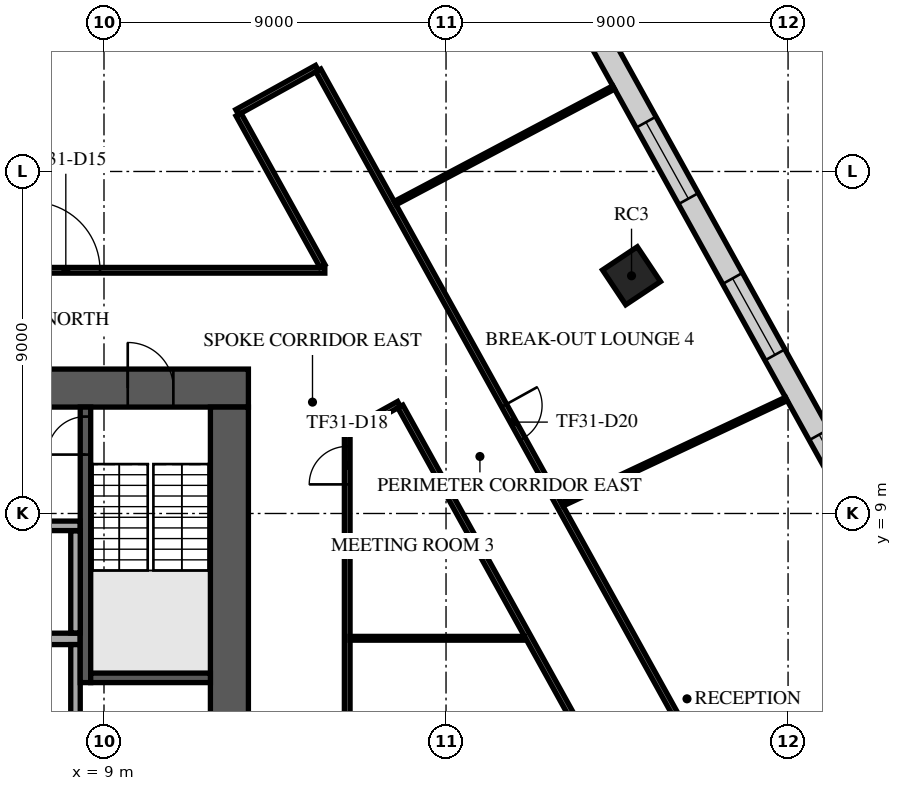
"""IFC4 building model, lengths in metres.
Left out: names, types, materials, properties, quantities, classifications, styles, units other than length and angle.
Written with IfcOpenShell. Run it as: python <this file> out.ifc"""

import sys

from ifc_helpers import new_model, si_unit, direction, frame, frame_2d, origin, origin_2d, place, context, subcontext, project, spatial, rectangle, extrude, element, fill, save


model = new_model("IFC4")
c1 = context("Model", 3, precision=1e-05, world=origin(), true_north=direction((0.0, 1.0)))
c2 = subcontext(c1, "Body", "Model", "MODEL_VIEW")
j1 = project(units=[si_unit("LENGTHUNIT", "METRE"), si_unit("PLANEANGLEUNIT", "RADIAN")], contexts=[c1])
p1 = place(None, origin())
s1 = spatial("IfcSite", under=j1, at=p1, CompositionType="ELEMENT")
p2 = place(p1, origin())
s2 = spatial("IfcBuilding", under=s1, at=p2, CompositionType="ELEMENT")
p3 = place(p2, frame((0.0, 0.0, 135.7)))
s3 = spatial("IfcBuildingStorey", under=s2, at=p3, CompositionType="ELEMENT", Elevation=135.7)
p4 = place(p3, frame((22.881, 15.255, -0.4), z_axis=(0.0, 0.0, 1.0), x_axis=(0.832028680356, 0.55473261583, 0.0)))
e1 = element("IfcColumn", 1, at=p4, inside=s3, PredefinedType="COLUMN", context=c2, shape_type="SweptSolid", body=[
    extrude(rectangle(XDim=1.1, YDim=1.1, at=origin_2d()), origin(), (0.0, 0.0, 1.0), 4.4),
])
p5 = place(p3, frame((-12.8, 12.3, 0.0), z_axis=(0.0, 0.0, 1.0), x_axis=(1.0, 0.0, 0.0)))
e2 = element("IfcWall", 2, at=p5, inside=s3, PredefinedType="SHEAR", context=c2, shape_type="SweptSolid", body=[
    extrude(rectangle(XDim=25.6, YDim=1.0, at=frame_2d((12.8, 0.0))), origin(), (0.0, 0.0, 1.0), 3.6),
])
p6 = place(p5, frame((11.6, 0.0, 0.0)))
e3 = element("IfcOpeningElement", 3, at=p6, cuts=e2, PredefinedType="OPENING", context=c2, shape_type="SweptSolid", body=[
    extrude(rectangle(XDim=2.4, YDim=2.4, at=frame_2d((1.2, 1.2))), frame((0.0, 0.51, 0.0), z_axis=(0.0, -1.0, 0.0), x_axis=(1.0, 0.0, 0.0)), (0.0, 0.0, 1.0), 1.02),
])
p7 = place(p5, frame((22.425, 0.0, 0.0)))
e4 = element("IfcOpeningElement", 4, at=p7, cuts=e2, PredefinedType="OPENING", context=c2, shape_type="SweptSolid", body=[
    extrude(rectangle(XDim=1.2, YDim=2.1, at=frame_2d((0.6, 1.05))), frame((0.0, 0.51, 0.0), z_axis=(0.0, -1.0, 0.0), x_axis=(1.0, 0.0, 0.0)), (0.0, 0.0, 1.0), 1.02),
])
p8 = place(p5, frame((1.4, 0.0, 0.0)))
e5 = element("IfcOpeningElement", 5, at=p8, cuts=e2, PredefinedType="OPENING", context=c2, shape_type="SweptSolid", body=[
    extrude(rectangle(XDim=1.0, YDim=2.1, at=frame_2d((0.5, 1.05))), frame((0.0, 0.51, 0.0), z_axis=(0.0, -1.0, 0.0), x_axis=(1.0, 0.0, 0.0)), (0.0, 0.0, 1.0), 1.02),
])
p9 = place(p3, frame((12.3, -11.8, 0.0), z_axis=(0.0, 0.0, 1.0), x_axis=(0.0, 1.0, 0.0)))
e6 = element("IfcWall", 6, at=p9, inside=s3, PredefinedType="SHEAR", context=c2, shape_type="SweptSolid", body=[
    extrude(rectangle(XDim=23.6, YDim=1.0, at=frame_2d((11.8, 0.0))), origin(), (0.0, 0.0, 1.0), 3.6),
])
p10 = place(p9, frame((10.6, 0.0, 0.0)))
e7 = element("IfcOpeningElement", 7, at=p10, cuts=e6, PredefinedType="OPENING", context=c2, shape_type="SweptSolid", body=[
    extrude(rectangle(XDim=2.4, YDim=2.4, at=frame_2d((1.2, 1.2))), frame((0.0, 0.51, 0.0), z_axis=(0.0, -1.0, 0.0), x_axis=(1.0, 0.0, 0.0)), (0.0, 0.0, 1.0), 1.02),
])
p11 = place(p3, frame((-8.375, 5.7, 0.0), z_axis=(0.0, 0.0, 1.0), x_axis=(1.0, 0.0, 0.0)))
e8 = element("IfcWall", 8, at=p11, inside=s3, PredefinedType="SOLIDWALL", context=c2, shape_type="SweptSolid", body=[
    extrude(rectangle(XDim=16.75, YDim=0.3, at=frame_2d((8.375, 0.0))), origin(), (0.0, 0.0, 1.0), 3.6),
])
p12 = place(p3, frame((8.25, 2.85, 0.0), z_axis=(0.0, 0.0, 1.0), x_axis=(0.0, 1.0, 0.0)))
e9 = element("IfcWall", 9, at=p12, inside=s3, PredefinedType="SOLIDWALL", context=c2, shape_type="SweptSolid", body=[
    extrude(rectangle(XDim=2.7, YDim=0.25, at=frame_2d((1.35, 0.0))), origin(), (0.0, 0.0, 1.0), 3.6),
])
p13 = place(p3, frame((8.512, 4.55, 0.0), z_axis=(0.0, 0.0, 1.0), x_axis=(0.0, 1.0, 0.0)))
e10 = element("IfcWall", 10, at=p13, inside=s3, PredefinedType="SOLIDWALL", context=c2, shape_type="SweptSolid", body=[
    extrude(rectangle(XDim=7.25, YDim=0.275, at=frame_2d((3.625, 0.0))), origin(), (0.0, 0.0, 1.0), 3.6),
])
p14 = place(p13, frame((6.0, 0.0, 0.0)))
e11 = element("IfcOpeningElement", 11, at=p14, cuts=e10, PredefinedType="OPENING", context=c2, shape_type="SweptSolid", body=[
    extrude(rectangle(XDim=1.0, YDim=2.1, at=frame_2d((0.5, 1.05))), frame((0.0, 0.147, 0.0), z_axis=(0.0, -1.0, 0.0), x_axis=(1.0, 0.0, 0.0)), (0.0, 0.0, 1.0), 0.295),
])
p15 = place(p3, frame((8.65, 4.675, 0.0), z_axis=(0.0, 0.0, 1.0), x_axis=(1.0, 0.0, 0.0)))
e12 = element("IfcWall", 12, at=p15, inside=s3, PredefinedType="SOLIDWALL", context=c2, shape_type="SweptSolid", body=[
    extrude(rectangle(XDim=3.15, YDim=0.25, at=frame_2d((1.575, 0.0))), origin(), (0.0, 0.0, 1.0), 3.6),
])
p16 = place(p3, frame((8.25, 5.855, 0.0), z_axis=(0.0, 0.0, 1.0), x_axis=(0.0, 1.0, 0.0)))
e13 = element("IfcWall", 13, at=p16, inside=s3, PredefinedType="PARTITIONING", context=c2, shape_type="SweptSolid", body=[
    extrude(rectangle(XDim=2.69, YDim=0.25, at=frame_2d((1.345, 0.0))), origin(), (0.0, 0.0, 1.0), 3.6),
])
p17 = place(p3, frame((-8.35, 8.675, 0.0), z_axis=(0.0, 0.0, 1.0), x_axis=(1.0, 0.0, 0.0)))
e14 = element("IfcWall", 14, at=p17, inside=s3, PredefinedType="PARTITIONING", context=c2, shape_type="SweptSolid", body=[
    extrude(rectangle(XDim=16.72, YDim=0.25, at=frame_2d((8.36, 0.0))), origin(), (0.0, 0.0, 1.0), 3.6),
])
p18 = place(p17, frame((0.975, 0.0, 0.0)))
e15 = element("IfcOpeningElement", 15, at=p18, cuts=e14, PredefinedType="OPENING", context=c2, shape_type="SweptSolid", body=[
    extrude(rectangle(XDim=1.0, YDim=2.1, at=frame_2d((0.5, 1.05))), frame((0.0, 0.135, 0.0), z_axis=(0.0, -1.0, 0.0), x_axis=(1.0, 0.0, 0.0)), (0.0, 0.0, 1.0), 0.27),
])
p19 = place(p17, frame((3.725, 0.0, 0.0)))
e16 = element("IfcOpeningElement", 16, at=p19, cuts=e14, PredefinedType="OPENING", context=c2, shape_type="SweptSolid", body=[
    extrude(rectangle(XDim=1.0, YDim=2.1, at=frame_2d((0.5, 1.05))), frame((0.0, 0.135, 0.0), z_axis=(0.0, -1.0, 0.0), x_axis=(1.0, 0.0, 0.0)), (0.0, 0.0, 1.0), 0.27),
])
p20 = place(p17, frame((9.125, 0.0, 0.0)))
e17 = element("IfcOpeningElement", 17, at=p20, cuts=e14, PredefinedType="OPENING", context=c2, shape_type="SweptSolid", body=[
    extrude(rectangle(XDim=1.2, YDim=2.1, at=frame_2d((0.6, 1.05))), frame((0.0, 0.135, 0.0), z_axis=(0.0, -1.0, 0.0), x_axis=(1.0, 0.0, 0.0)), (0.0, 0.0, 1.0), 0.27),
])
p21 = place(p3, frame((8.775, 34.705, 0.0), z_axis=(0.0, 0.0, 1.0), x_axis=(-0.874620778241, -0.484807687922, 0.0)))
e18 = element("IfcWall", 18, at=p21, inside=s3, PredefinedType="STANDARD", context=c2, shape_type="SweptSolid", body=[
    extrude(rectangle(XDim=49.376, YDim=0.6, at=frame_2d((24.688, 0.0))), origin(), (0.0, 0.0, 1.0), 3.6),
])
p22 = place(p21, frame((1.2, 0.0, 0.9)))
e19 = element("IfcOpeningElement", 19, at=p22, cuts=e18, PredefinedType="OPENING", context=c2, shape_type="SweptSolid", body=[
    extrude(rectangle(XDim=2.1, YDim=2.1, at=frame_2d((1.05, 1.05))), frame((0.0, 0.31, 0.0), z_axis=(0.0, -1.0, 0.0), x_axis=(1.0, 0.0, 0.0)), (0.0, 0.0, 1.0), 0.62),
])
p23 = place(p21, frame((5.7, 0.0, 0.9)))
e20 = element("IfcOpeningElement", 20, at=p23, cuts=e18, PredefinedType="OPENING", context=c2, shape_type="SweptSolid", body=[
    extrude(rectangle(XDim=2.1, YDim=2.1, at=frame_2d((1.05, 1.05))), frame((0.0, 0.31, 0.0), z_axis=(0.0, -1.0, 0.0), x_axis=(1.0, 0.0, 0.0)), (0.0, 0.0, 1.0), 0.62),
])
p24 = place(p21, frame((14.7, 0.0, 0.9)))
e21 = element("IfcOpeningElement", 21, at=p24, cuts=e18, PredefinedType="OPENING", context=c2, shape_type="SweptSolid", body=[
    extrude(rectangle(XDim=2.1, YDim=2.1, at=frame_2d((1.05, 1.05))), frame((0.0, 0.31, 0.0), z_axis=(0.0, -1.0, 0.0), x_axis=(1.0, 0.0, 0.0)), (0.0, 0.0, 1.0), 0.62),
])
p25 = place(p21, frame((19.2, 0.0, 0.9)))
e22 = element("IfcOpeningElement", 22, at=p25, cuts=e18, PredefinedType="OPENING", context=c2, shape_type="SweptSolid", body=[
    extrude(rectangle(XDim=2.1, YDim=2.1, at=frame_2d((1.05, 1.05))), frame((0.0, 0.31, 0.0), z_axis=(0.0, -1.0, 0.0), x_axis=(1.0, 0.0, 0.0)), (0.0, 0.0, 1.0), 0.62),
])
p26 = place(p21, frame((23.7, 0.0, 0.9)))
e23 = element("IfcOpeningElement", 23, at=p26, cuts=e18, PredefinedType="OPENING", context=c2, shape_type="SweptSolid", body=[
    extrude(rectangle(XDim=2.1, YDim=2.1, at=frame_2d((1.05, 1.05))), frame((0.0, 0.31, 0.0), z_axis=(0.0, -1.0, 0.0), x_axis=(1.0, 0.0, 0.0)), (0.0, 0.0, 1.0), 0.62),
])
p27 = place(p21, frame((28.2, 0.0, 0.9)))
e24 = element("IfcOpeningElement", 24, at=p27, cuts=e18, PredefinedType="OPENING", context=c2, shape_type="SweptSolid", body=[
    extrude(rectangle(XDim=2.1, YDim=2.1, at=frame_2d((1.05, 1.05))), frame((0.0, 0.31, 0.0), z_axis=(0.0, -1.0, 0.0), x_axis=(1.0, 0.0, 0.0)), (0.0, 0.0, 1.0), 0.62),
])
p28 = place(p21, frame((32.7, 0.0, 0.9)))
e25 = element("IfcOpeningElement", 25, at=p28, cuts=e18, PredefinedType="OPENING", context=c2, shape_type="SweptSolid", body=[
    extrude(rectangle(XDim=2.1, YDim=2.1, at=frame_2d((1.05, 1.05))), frame((0.0, 0.31, 0.0), z_axis=(0.0, -1.0, 0.0), x_axis=(1.0, 0.0, 0.0)), (0.0, 0.0, 1.0), 0.62),
])
p29 = place(p21, frame((37.2, 0.0, 0.9)))
e26 = element("IfcOpeningElement", 26, at=p29, cuts=e18, PredefinedType="OPENING", context=c2, shape_type="SweptSolid", body=[
    extrude(rectangle(XDim=2.1, YDim=2.1, at=frame_2d((1.05, 1.05))), frame((0.0, 0.31, 0.0), z_axis=(0.0, -1.0, 0.0), x_axis=(1.0, 0.0, 0.0)), (0.0, 0.0, 1.0), 0.62),
])
p30 = place(p21, frame((41.7, 0.0, 0.9)))
e27 = element("IfcOpeningElement", 27, at=p30, cuts=e18, PredefinedType="OPENING", context=c2, shape_type="SweptSolid", body=[
    extrude(rectangle(XDim=2.1, YDim=2.1, at=frame_2d((1.05, 1.05))), frame((0.0, 0.31, 0.0), z_axis=(0.0, -1.0, 0.0), x_axis=(1.0, 0.0, 0.0)), (0.0, 0.0, 1.0), 0.62),
])
p31 = place(p21, frame((46.138, 0.0, 0.9)))
e28 = element("IfcOpeningElement", 28, at=p31, cuts=e18, PredefinedType="OPENING", context=c2, shape_type="SweptSolid", body=[
    extrude(rectangle(XDim=2.1, YDim=2.1, at=frame_2d((1.05, 1.05))), frame((0.0, 0.31, 0.0), z_axis=(0.0, -1.0, 0.0), x_axis=(1.0, 0.0, 0.0)), (0.0, 0.0, 1.0), 0.62),
])
p32 = place(p3, frame((36.291, -4.209, 0.0), z_axis=(0.0, 0.0, 1.0), x_axis=(-0.484811111615, 0.874618880458, 0.0)))
e29 = element("IfcWall", 29, at=p32, inside=s3, PredefinedType="STANDARD", context=c2, shape_type="SweptSolid", body=[
    extrude(rectangle(XDim=42.176, YDim=0.6, at=frame_2d((21.088, 0.0))), origin(), (0.0, 0.0, 1.0), 3.6),
])
p33 = place(p32, frame((1.138, 0.0, 0.9)))
e30 = element("IfcOpeningElement", 30, at=p33, cuts=e29, PredefinedType="OPENING", context=c2, shape_type="SweptSolid", body=[
    extrude(rectangle(XDim=2.3, YDim=2.1, at=frame_2d((1.15, 1.05))), frame((0.0, 0.31, 0.0), z_axis=(0.0, -1.0, 0.0), x_axis=(1.0, 0.0, 0.0)), (0.0, 0.0, 1.0), 0.62),
])
p34 = place(p32, frame((5.776, 0.0, 0.9)))
e31 = element("IfcOpeningElement", 31, at=p34, cuts=e29, PredefinedType="OPENING", context=c2, shape_type="SweptSolid", body=[
    extrude(rectangle(XDim=2.3, YDim=2.1, at=frame_2d((1.15, 1.05))), frame((0.0, 0.31, 0.0), z_axis=(0.0, -1.0, 0.0), x_axis=(1.0, 0.0, 0.0)), (0.0, 0.0, 1.0), 0.62),
])
p35 = place(p32, frame((15.176, 0.0, 0.9)))
e32 = element("IfcOpeningElement", 32, at=p35, cuts=e29, PredefinedType="OPENING", context=c2, shape_type="SweptSolid", body=[
    extrude(rectangle(XDim=2.3, YDim=2.1, at=frame_2d((1.15, 1.05))), frame((0.0, 0.31, 0.0), z_axis=(0.0, -1.0, 0.0), x_axis=(1.0, 0.0, 0.0)), (0.0, 0.0, 1.0), 0.62),
])
p36 = place(p32, frame((19.876, 0.0, 0.9)))
e33 = element("IfcOpeningElement", 33, at=p36, cuts=e29, PredefinedType="OPENING", context=c2, shape_type="SweptSolid", body=[
    extrude(rectangle(XDim=2.3, YDim=2.1, at=frame_2d((1.15, 1.05))), frame((0.0, 0.31, 0.0), z_axis=(0.0, -1.0, 0.0), x_axis=(1.0, 0.0, 0.0)), (0.0, 0.0, 1.0), 0.62),
])
p37 = place(p32, frame((24.576, 0.0, 0.9)))
e34 = element("IfcOpeningElement", 34, at=p37, cuts=e29, PredefinedType="OPENING", context=c2, shape_type="SweptSolid", body=[
    extrude(rectangle(XDim=2.3, YDim=2.1, at=frame_2d((1.15, 1.05))), frame((0.0, 0.31, 0.0), z_axis=(0.0, -1.0, 0.0), x_axis=(1.0, 0.0, 0.0)), (0.0, 0.0, 1.0), 0.62),
])
p38 = place(p32, frame((29.276, 0.0, 0.9)))
e35 = element("IfcOpeningElement", 35, at=p38, cuts=e29, PredefinedType="OPENING", context=c2, shape_type="SweptSolid", body=[
    extrude(rectangle(XDim=2.3, YDim=2.1, at=frame_2d((1.15, 1.05))), frame((0.0, 0.31, 0.0), z_axis=(0.0, -1.0, 0.0), x_axis=(1.0, 0.0, 0.0)), (0.0, 0.0, 1.0), 0.62),
])
p39 = place(p32, frame((33.976, 0.0, 0.9)))
e36 = element("IfcOpeningElement", 36, at=p39, cuts=e29, PredefinedType="OPENING", context=c2, shape_type="SweptSolid", body=[
    extrude(rectangle(XDim=2.3, YDim=2.1, at=frame_2d((1.15, 1.05))), frame((0.0, 0.31, 0.0), z_axis=(0.0, -1.0, 0.0), x_axis=(1.0, 0.0, 0.0)), (0.0, 0.0, 1.0), 0.62),
])
p40 = place(p32, frame((38.676, 0.0, 0.9)))
e37 = element("IfcOpeningElement", 37, at=p40, cuts=e29, PredefinedType="OPENING", context=c2, shape_type="SweptSolid", body=[
    extrude(rectangle(XDim=2.3, YDim=2.1, at=frame_2d((1.15, 1.05))), frame((0.0, 0.31, 0.0), z_axis=(0.0, -1.0, 0.0), x_axis=(1.0, 0.0, 0.0)), (0.0, 0.0, 1.0), 0.62),
])
p41 = place(p3, frame((-3.075, 15.4, 0.0), z_axis=(0.0, 0.0, 1.0), x_axis=(1.0, 0.0, 0.0)))
e38 = element("IfcWall", 38, at=p41, inside=s3, PredefinedType="PARTITIONING", context=c2, shape_type="SweptSolid", body=[
    extrude(rectangle(XDim=17.886, YDim=0.15, at=frame_2d((8.943, 0.0))), origin(), (0.0, 0.0, 1.0), 3.15),
])
p42 = place(p41, frame((10.17, 0.0, 0.0)))
e39 = element("IfcOpeningElement", 39, at=p42, cuts=e38, PredefinedType="OPENING", context=c2, shape_type="SweptSolid", body=[
    extrude(rectangle(XDim=1.8, YDim=2.1, at=frame_2d((0.9, 1.05))), frame((0.0, 0.085, 0.0), z_axis=(0.0, -1.0, 0.0), x_axis=(1.0, 0.0, 0.0)), (0.0, 0.0, 1.0), 0.17),
])
p43 = place(p3, frame((12.504, 19.563, 0.0), z_axis=(0.0, 0.0, 1.0), x_axis=(0.874703778473, 0.484657920522, 0.0)))
e40 = element("IfcWall", 40, at=p43, inside=s3, PredefinedType="PARTITIONING", context=c2, shape_type="SweptSolid", body=[
    extrude(rectangle(XDim=2.4, YDim=0.15, at=frame_2d((1.2, 0.0))), origin(), (0.0, 0.0, 1.0), 3.15),
])
p44 = place(p3, frame((12.54, 19.497, 0.0), z_axis=(0.0, 0.0, 1.0), x_axis=(0.48474201542, -0.874657177691, 0.0)))
e41 = element("IfcWall", 41, at=p44, inside=s3, PredefinedType="PARTITIONING", context=c2, shape_type="SweptSolid", body=[
    extrude(rectangle(XDim=4.557, YDim=0.15, at=frame_2d((2.279, 0.0))), origin(), (0.0, 0.0, 1.0), 3.15),
])
p45 = place(p3, frame((14.639, 20.66, 0.0), z_axis=(0.0, 0.0, 1.0), x_axis=(0.484803020703, -0.874623365294, 0.0)))
e42 = element("IfcWall", 42, at=p45, inside=s3, PredefinedType="PARTITIONING", context=c2, shape_type="SweptSolid", body=[
    extrude(rectangle(XDim=22.02, YDim=0.15, at=frame_2d((11.01, 0.0))), origin(), (0.0, 0.0, 1.0), 3.15),
])
p46 = place(p45, frame((10.083, 0.0, 0.0)))
e43 = element("IfcOpeningElement", 43, at=p46, cuts=e42, PredefinedType="OPENING", context=c2, shape_type="SweptSolid", body=[
    extrude(rectangle(XDim=1.0, YDim=2.1, at=frame_2d((0.5, 1.05))), frame((0.0, 0.085, 0.0), z_axis=(0.0, -1.0, 0.0), x_axis=(1.0, 0.0, 0.0)), (0.0, 0.0, 1.0), 0.17),
])
p47 = place(p3, frame((15.4, -10.568, 0.0), z_axis=(0.0, 0.0, 1.0), x_axis=(0.0, 1.0, 0.0)))
e44 = element("IfcWall", 44, at=p47, inside=s3, PredefinedType="PARTITIONING", context=c2, shape_type="SweptSolid", body=[
    extrude(rectangle(XDim=21.695, YDim=0.15, at=frame_2d((10.847, 0.0))), origin(), (0.0, 0.0, 1.0), 3.15),
])
p48 = place(p47, frame((20.333, 0.0, 0.0)))
e45 = element("IfcOpeningElement", 45, at=p48, cuts=e44, PredefinedType="OPENING", context=c2, shape_type="SweptSolid", body=[
    extrude(rectangle(XDim=1.0, YDim=2.1, at=frame_2d((0.5, 1.05))), frame((0.0, 0.085, 0.0), z_axis=(0.0, -1.0, 0.0), x_axis=(1.0, 0.0, 0.0)), (0.0, 0.0, 1.0), 0.17),
])
p49 = place(p47, frame((7.55, 0.0, 0.0)))
e46 = element("IfcOpeningElement", 46, at=p49, cuts=e44, PredefinedType="OPENING", context=c2, shape_type="SweptSolid", body=[
    extrude(rectangle(XDim=1.0, YDim=2.1, at=frame_2d((0.5, 1.05))), frame((0.0, 0.085, 0.0), z_axis=(0.0, -1.0, 0.0), x_axis=(1.0, 0.0, 0.0)), (0.0, 0.0, 1.0), 0.17),
])
p50 = place(p3, frame((15.511, 11.189, 0.0), z_axis=(0.0, 0.0, 1.0), x_axis=(0.874559677803, 0.484917900227, 0.0)))
e47 = element("IfcWall", 47, at=p50, inside=s3, PredefinedType="PARTITIONING", context=c2, shape_type="SweptSolid", body=[
    extrude(rectangle(XDim=1.43, YDim=0.15, at=frame_2d((0.715, 0.0))), origin(), (0.0, 0.0, 1.0), 3.6),
])
p51 = place(p3, frame((16.798, 11.816, 0.0), z_axis=(0.0, 0.0, 1.0), x_axis=(0.484762728721, -0.874645697893, 0.0)))
e48 = element("IfcWall", 48, at=p51, inside=s3, PredefinedType="PARTITIONING", context=c2, shape_type="SweptSolid", body=[
    extrude(rectangle(XDim=13.239, YDim=0.15, at=frame_2d((6.62, 0.0))), origin(), (0.0, 0.0, 1.0), 3.15),
])
p52 = place(p51, frame((10.503, 0.0, 0.0)))
e49 = element("IfcOpeningElement", 49, at=p52, cuts=e48, PredefinedType="OPENING", context=c2, shape_type="SweptSolid", body=[
    extrude(rectangle(XDim=1.0, YDim=2.1, at=frame_2d((0.5, 1.05))), frame((0.0, 0.085, 0.0), z_axis=(0.0, -1.0, 0.0), x_axis=(1.0, 0.0, 0.0)), (0.0, 0.0, 1.0), 0.17),
])
p53 = place(p3, frame((15.475, 5.716, 0.0), z_axis=(0.0, 0.0, 1.0), x_axis=(1.0, 0.0, 0.0)))
e50 = element("IfcWall", 50, at=p53, inside=s3, PredefinedType="PARTITIONING", context=c2, shape_type="SweptSolid", body=[
    extrude(rectangle(XDim=4.59, YDim=0.1, at=frame_2d((2.295, 0.0))), origin(), (0.0, 0.0, 1.0), 3.03),
])
p54 = place(p3, frame((16.662, 17.168, 0.0), z_axis=(0.0, 0.0, 1.0), x_axis=(0.883911173827, 0.467654826538, 0.0)))
e51 = element("IfcWall", 51, at=p54, inside=s3, PredefinedType="PARTITIONING", context=c2, shape_type="SweptSolid", body=[
    extrude(rectangle(XDim=6.503, YDim=0.1, at=frame_2d((3.251, 0.0))), origin(), (0.0, 0.0, 1.0), 3.15),
])
p55 = place(p3, frame((21.058, 9.242, 0.0), z_axis=(0.0, 0.0, 1.0), x_axis=(0.905003789347, 0.425403504062, 0.0)))
e52 = element("IfcWall", 52, at=p55, inside=s3, PredefinedType="PARTITIONING", context=c2, shape_type="SweptSolid", body=[
    extrude(rectangle(XDim=6.514, YDim=0.1, at=frame_2d((3.257, 0.0))), origin(), (0.0, 0.0, 1.0), 3.15),
])
p56 = place(p7, origin())
e53 = element("IfcDoor", 53, at=p56, inside=s3, OperationType="SINGLE_SWING_LEFT", PredefinedType="DOOR", context=c2, shape_type="SweptSolid", body=[
    extrude(rectangle(XDim=1.2, YDim=2.1, at=frame_2d((0.6, 1.05))), frame((0.0, 0.025, 0.0), z_axis=(0.0, -1.0, 0.0), x_axis=(1.0, 0.0, 0.0)), (0.0, 0.0, 1.0), 0.05),
])
fill(e4, e53)
p57 = place(p14, origin())
e54 = element("IfcDoor", 54, at=p57, inside=s3, OperationType="SINGLE_SWING_LEFT", PredefinedType="DOOR", context=c2, shape_type="SweptSolid", body=[
    extrude(rectangle(XDim=1.0, YDim=2.1, at=frame_2d((0.5, 1.05))), frame((0.0, 0.025, 0.0), z_axis=(0.0, -1.0, 0.0), x_axis=(1.0, 0.0, 0.0)), (0.0, 0.0, 1.0), 0.05),
])
fill(e11, e54)
p58 = place(p35, origin())
e55 = element("IfcWindow", 55, at=p58, inside=s3, PartitioningType="SINGLE_PANEL", PredefinedType="WINDOW", context=c2, shape_type="SweptSolid", body=[
    extrude(rectangle(XDim=2.3, YDim=2.1, at=frame_2d((1.15, 1.05))), frame((0.0, 0.03, 0.0), z_axis=(0.0, -1.0, 0.0), x_axis=(1.0, 0.0, 0.0)), (0.0, 0.0, 1.0), 0.06),
])
fill(e32, e55)
p59 = place(p36, origin())
e56 = element("IfcWindow", 56, at=p59, inside=s3, PartitioningType="SINGLE_PANEL", PredefinedType="WINDOW", context=c2, shape_type="SweptSolid", body=[
    extrude(rectangle(XDim=2.3, YDim=2.1, at=frame_2d((1.15, 1.05))), frame((0.0, 0.03, 0.0), z_axis=(0.0, -1.0, 0.0), x_axis=(1.0, 0.0, 0.0)), (0.0, 0.0, 1.0), 0.06),
])
fill(e33, e56)
p60 = place(p37, origin())
e57 = element("IfcWindow", 57, at=p60, inside=s3, PartitioningType="SINGLE_PANEL", PredefinedType="WINDOW", context=c2, shape_type="SweptSolid", body=[
    extrude(rectangle(XDim=2.3, YDim=2.1, at=frame_2d((1.15, 1.05))), frame((0.0, 0.03, 0.0), z_axis=(0.0, -1.0, 0.0), x_axis=(1.0, 0.0, 0.0)), (0.0, 0.0, 1.0), 0.06),
])
fill(e34, e57)
p61 = place(p42, origin())
e58 = element("IfcDoor", 58, at=p61, inside=s3, OperationType="DOUBLE_DOOR_SINGLE_SWING", PredefinedType="DOOR", context=c2, shape_type="SweptSolid", body=[
    extrude(rectangle(XDim=1.8, YDim=2.1, at=frame_2d((0.9, 1.05))), frame((0.0, 0.025, 0.0), z_axis=(0.0, -1.0, 0.0), x_axis=(1.0, 0.0, 0.0)), (0.0, 0.0, 1.0), 0.05),
])
fill(e39, e58)
p62 = place(p48, frame((1.0, 0.0, 0.0), z_axis=(0.0, 0.0, 1.0), x_axis=(-1.0, 0.0, 0.0)))
e59 = element("IfcDoor", 59, at=p62, inside=s3, OperationType="SINGLE_SWING_LEFT", PredefinedType="DOOR", context=c2, shape_type="SweptSolid", body=[
    extrude(rectangle(XDim=1.0, YDim=2.1, at=frame_2d((0.5, 1.05))), frame((0.0, 0.025, 0.0), z_axis=(0.0, -1.0, 0.0), x_axis=(1.0, 0.0, 0.0)), (0.0, 0.0, 1.0), 0.05),
])
fill(e45, e59)
p63 = place(p46, origin())
e60 = element("IfcDoor", 60, at=p63, inside=s3, OperationType="SINGLE_SWING_RIGHT", PredefinedType="DOOR", context=c2, shape_type="SweptSolid", body=[
    extrude(rectangle(XDim=1.0, YDim=2.1, at=frame_2d((0.5, 1.05))), frame((0.0, 0.025, 0.0), z_axis=(0.0, -1.0, 0.0), x_axis=(1.0, 0.0, 0.0)), (0.0, 0.0, 1.0), 0.05),
])
fill(e43, e60)
save(model, sys.argv[1])
